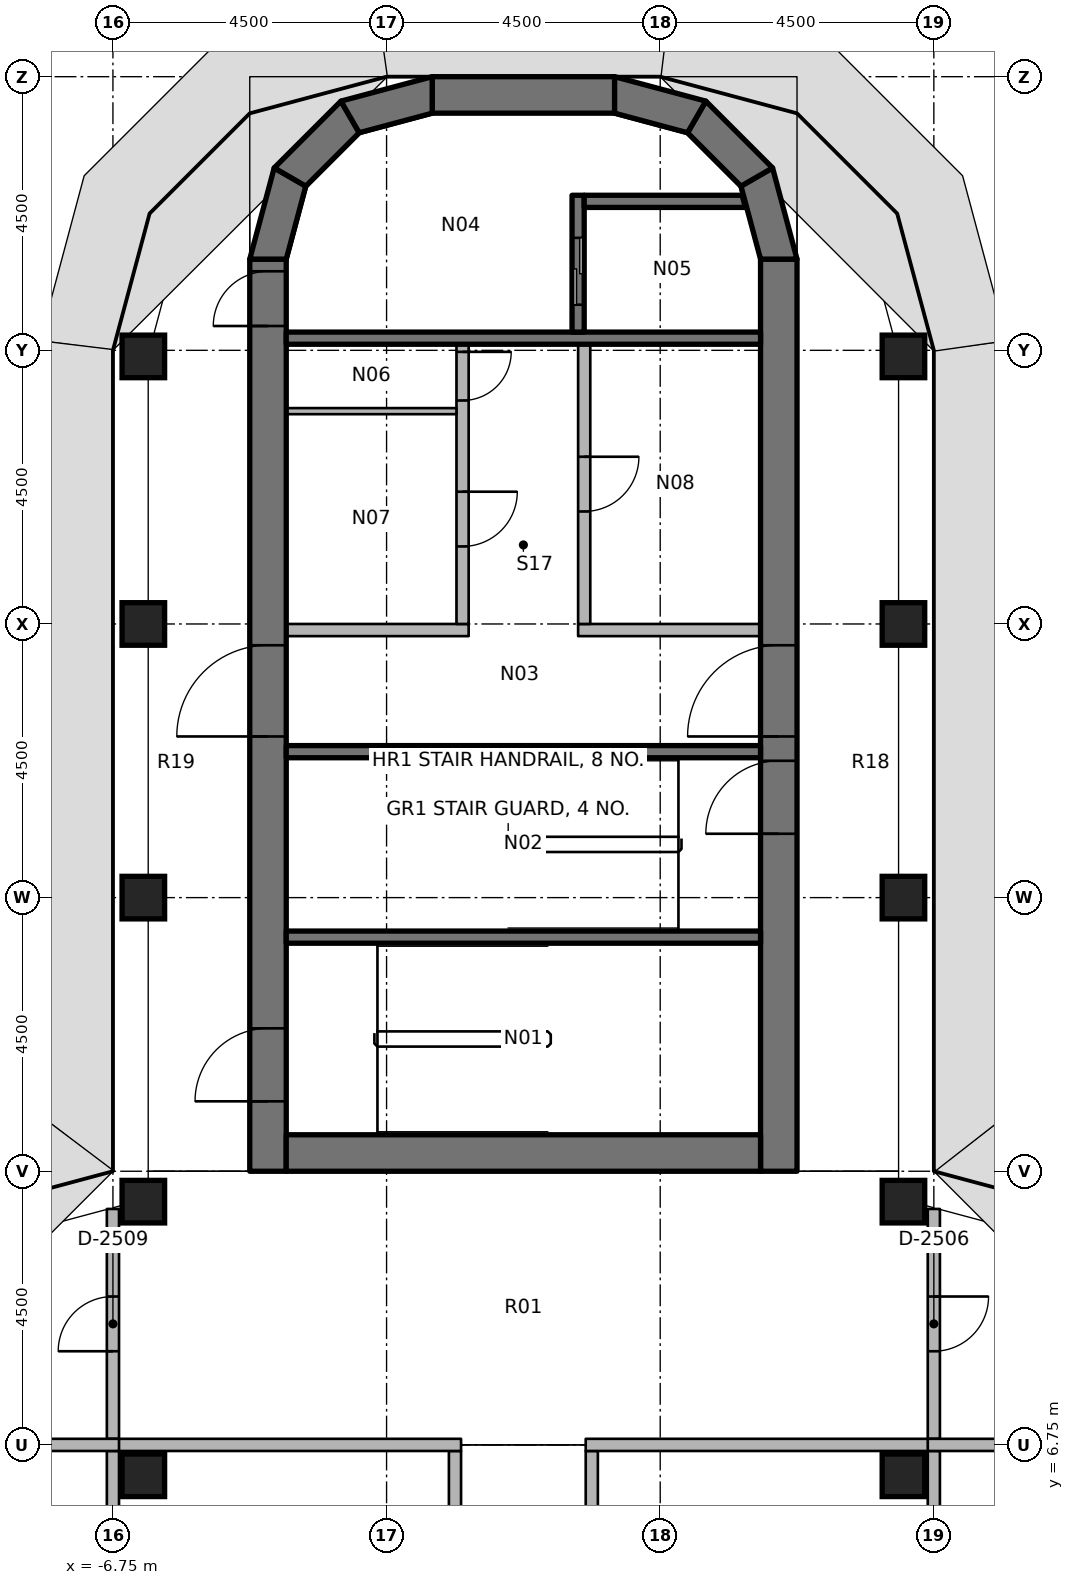
"""IFC4 building model, lengths in metres.
Left out: names, types, materials, properties, quantities, classifications, styles, units other than length and angle.
Written with IfcOpenShell. Run it as: python <this file> out.ifc"""

import sys

from ifc_helpers import new_model, si_unit, direction, frame, frame_2d, origin, origin_2d, place, context, subcontext, project, spatial, polyline, rectangle, outline, extrude, element, fill, save


model = new_model("IFC4")
c1 = context("Model", 3, precision=1e-05, world=origin(), true_north=direction((0.0, 1.0)))
c2 = subcontext(c1, "Body", "Model", "MODEL_VIEW")
j1 = project(units=[si_unit("LENGTHUNIT", "METRE"), si_unit("PLANEANGLEUNIT", "RADIAN")], contexts=[c1])
p1 = place(None, origin())
s1 = spatial("IfcSite", under=j1, at=p1, CompositionType="ELEMENT")
p2 = place(p1, origin())
s2 = spatial("IfcBuilding", under=s1, at=p2, CompositionType="ELEMENT")
p3 = place(p2, frame((0.0, 0.0, 233.4)))
s3 = spatial("IfcBuildingStorey", under=s2, at=p3, CompositionType="ELEMENT", Elevation=233.4)
for number, where, z_axis, x_axis in (
    (1, (-6.25, 6.25, 0.0), (0.0, 0.0, 1.0), (1.0, 0.0, 0.0)),
    (2, (-6.25, 10.75, 0.0), (0.0, 0.0, 1.0), (1.0, 0.0, 0.0)),
    (3, (-6.25, 15.75, 0.0), (0.0, 0.0, 1.0), (1.0, 0.0, 0.0)),
    (4, (-6.25, 20.25, 0.0), (0.0, 0.0, 1.0), (1.0, 0.0, 0.0)),
    (5, (-6.25, 24.65, 0.0), (0.0, 0.0, 1.0), (1.0, 0.0, 0.0)),
    (6, (6.25, 6.25, 0.0), (0.0, 0.0, 1.0), (1.0, 0.0, 0.0)),
    (7, (6.25, 10.75, 0.0), (0.0, 0.0, 1.0), (1.0, 0.0, 0.0)),
    (8, (6.25, 15.75, 0.0), (0.0, 0.0, 1.0), (1.0, 0.0, 0.0)),
    (9, (6.25, 20.25, 0.0), (0.0, 0.0, 1.0), (1.0, 0.0, 0.0)),
    (10, (6.25, 24.65, 0.0), (0.0, 0.0, 1.0), (1.0, 0.0, 0.0)),
):
    element("IfcColumn", number, at=place(p3, frame(where, z_axis=z_axis, x_axis=x_axis)), inside=s3, PredefinedType="COLUMN", context=c2, shape_type="SweptSolid", body=[
        extrude(rectangle(XDim=0.7, YDim=0.7, at=origin_2d()), origin(), (0.0, 0.0, 1.0), 3.65),
    ])
p4 = place(p3, frame((-4.2, 11.25, 0.0), z_axis=(0.0, 0.0, 1.0), x_axis=(0.0, 1.0, 0.0)))
e11 = element("IfcWall", 11, at=p4, inside=s3, PredefinedType="SHEAR", context=c2, shape_type="SweptSolid", body=[
    extrude(rectangle(XDim=15.0, YDim=0.6, at=frame_2d((7.5, 0.0))), origin(), (0.0, 0.0, 1.0), 3.8),
])
p5 = place(p4, frame((7.15, 0.0, 0.0)))
e12 = element("IfcOpeningElement", 12, at=p5, cuts=e11, PredefinedType="OPENING", context=c2, shape_type="SweptSolid", body=[
    extrude(rectangle(XDim=1.5, YDim=2.3, at=frame_2d((0.75, 1.15))), frame((0.0, 0.31, 0.0), z_axis=(0.0, -1.0, 0.0), x_axis=(1.0, 0.0, 0.0)), (0.0, 0.0, 1.0), 0.62),
])
p6 = place(p4, frame((13.9, 0.0, 0.0)))
e13 = element("IfcOpeningElement", 13, at=p6, cuts=e11, PredefinedType="OPENING", context=c2, shape_type="SweptSolid", body=[
    extrude(rectangle(XDim=0.9, YDim=2.1, at=frame_2d((0.45, 1.05))), frame((0.0, 0.31, 0.0), z_axis=(0.0, -1.0, 0.0), x_axis=(1.0, 0.0, 0.0)), (0.0, 0.0, 1.0), 0.62),
])
p7 = place(p4, frame((1.15, 0.0, 0.0)))
e14 = element("IfcOpeningElement", 14, at=p7, cuts=e11, PredefinedType="OPENING", context=c2, shape_type="SweptSolid", body=[
    extrude(rectangle(XDim=1.2, YDim=2.1, at=frame_2d((0.6, 1.05))), frame((0.0, 0.31, 0.0), z_axis=(0.0, -1.0, 0.0), x_axis=(1.0, 0.0, 0.0)), (0.0, 0.0, 1.0), 0.62),
])
p8 = place(p3, frame((4.2, 11.25, 0.0), z_axis=(0.0, 0.0, 1.0), x_axis=(0.0, 1.0, 0.0)))
e15 = element("IfcWall", 15, at=p8, inside=s3, PredefinedType="SHEAR", context=c2, shape_type="SweptSolid", body=[
    extrude(rectangle(XDim=15.0, YDim=0.6, at=frame_2d((7.5, 0.0))), origin(), (0.0, 0.0, 1.0), 3.8),
])
p9 = place(p8, frame((7.15, 0.0, 0.0)))
e16 = element("IfcOpeningElement", 16, at=p9, cuts=e15, PredefinedType="OPENING", context=c2, shape_type="SweptSolid", body=[
    extrude(rectangle(XDim=1.5, YDim=2.3, at=frame_2d((0.75, 1.15))), frame((0.0, 0.31, 0.0), z_axis=(0.0, -1.0, 0.0), x_axis=(1.0, 0.0, 0.0)), (0.0, 0.0, 1.0), 0.62),
])
p10 = place(p8, frame((5.55, 0.0, 0.0)))
e17 = element("IfcOpeningElement", 17, at=p10, cuts=e15, PredefinedType="OPENING", context=c2, shape_type="SweptSolid", body=[
    extrude(rectangle(XDim=1.2, YDim=2.1, at=frame_2d((0.6, 1.05))), frame((0.0, 0.31, 0.0), z_axis=(0.0, -1.0, 0.0), x_axis=(1.0, 0.0, 0.0)), (0.0, 0.0, 1.0), 0.62),
])
p11 = place(p3, frame((-3.9, 11.55, 0.0), z_axis=(0.0, 0.0, 1.0), x_axis=(1.0, 0.0, 0.0)))
e18 = element("IfcWall", 18, at=p11, inside=s3, PredefinedType="SHEAR", context=c2, shape_type="SweptSolid", body=[
    extrude(rectangle(XDim=7.8, YDim=0.6, at=frame_2d((3.9, 0.0))), origin(), (0.0, 0.0, 1.0), 3.8),
])
p12 = place(p3, frame((-1.5, 28.95, 0.0), z_axis=(0.0, 0.0, 1.0), x_axis=(1.0, 0.0, 0.0)))
e19 = element("IfcWall", 19, at=p12, inside=s3, PredefinedType="SHEAR", context=c2, shape_type="SweptSolid", body=[
    extrude(rectangle(XDim=3.0, YDim=0.6, at=frame_2d((1.5, 0.0))), origin(), (0.0, 0.0, 1.0), 3.8),
])
p13 = place(p3, origin())
e20 = element("IfcWall", 20, at=p13, inside=s3, PredefinedType="SHEAR", context=c2, shape_type="SweptSolid", body=[
    extrude(outline(polyline([(-4.5, 26.25), (-4.098, 27.75), (-3.579, 27.45), (-3.9, 26.25), (-4.5, 26.25)])), origin(), (0.0, 0.0, 1.0), 3.8),
])
p14 = place(p3, origin())
e21 = element("IfcWall", 21, at=p14, inside=s3, PredefinedType="SHEAR", context=c2, shape_type="SweptSolid", body=[
    extrude(outline(polyline([(-4.098, 27.75), (-3.0, 28.848), (-2.7, 28.329), (-3.579, 27.45), (-4.098, 27.75)])), origin(), (0.0, 0.0, 1.0), 3.8),
])
p15 = place(p3, origin())
e22 = element("IfcWall", 22, at=p15, inside=s3, PredefinedType="SHEAR", context=c2, shape_type="SweptSolid", body=[
    extrude(outline(polyline([(-3.0, 28.848), (-1.5, 29.25), (-1.5, 28.65), (-2.7, 28.329), (-3.0, 28.848)])), origin(), (0.0, 0.0, 1.0), 3.8),
])
p16 = place(p3, origin())
e23 = element("IfcWall", 23, at=p16, inside=s3, PredefinedType="SHEAR", context=c2, shape_type="SweptSolid", body=[
    extrude(outline(polyline([(4.5, 26.25), (4.098, 27.75), (3.579, 27.45), (3.9, 26.25), (4.5, 26.25)])), origin(), (0.0, 0.0, 1.0), 3.8),
])
p17 = place(p3, origin())
e24 = element("IfcWall", 24, at=p17, inside=s3, PredefinedType="SHEAR", context=c2, shape_type="SweptSolid", body=[
    extrude(outline(polyline([(4.098, 27.75), (3.0, 28.848), (2.7, 28.329), (3.579, 27.45), (4.098, 27.75)])), origin(), (0.0, 0.0, 1.0), 3.8),
])
p18 = place(p3, origin())
e25 = element("IfcWall", 25, at=p18, inside=s3, PredefinedType="SHEAR", context=c2, shape_type="SweptSolid", body=[
    extrude(outline(polyline([(3.0, 28.848), (1.5, 29.25), (1.5, 28.65), (2.7, 28.329), (3.0, 28.848)])), origin(), (0.0, 0.0, 1.0), 3.8),
])
p19 = place(p3, frame((-3.9, 24.95, 0.0), z_axis=(0.0, 0.0, 1.0), x_axis=(1.0, 0.0, 0.0)))
e26 = element("IfcWall", 26, at=p19, inside=s3, PredefinedType="SHEAR", context=c2, shape_type="SweptSolid", body=[
    extrude(rectangle(XDim=7.8, YDim=0.2, at=frame_2d((3.9, 0.0))), origin(), (0.0, 0.0, 1.0), 3.65),
])
p20 = place(p3, frame((0.9, 27.3, 0.0), z_axis=(0.0, 0.0, 1.0), x_axis=(0.0, -1.0, 0.0)))
e27 = element("IfcWall", 27, at=p20, inside=s3, PredefinedType="SHEAR", context=c2, shape_type="SweptSolid", body=[
    extrude(rectangle(XDim=2.25, YDim=0.2, at=frame_2d((1.125, 0.0))), origin(), (0.0, 0.0, 1.0), 3.65),
])
p21 = place(p20, frame((0.7, 0.0, 0.0)))
e28 = element("IfcOpeningElement", 28, at=p21, cuts=e27, PredefinedType="OPENING", context=c2, shape_type="SweptSolid", body=[
    extrude(rectangle(XDim=1.1, YDim=2.3, at=frame_2d((0.55, 1.15))), frame((0.0, 0.11, 0.0), z_axis=(0.0, -1.0, 0.0), x_axis=(1.0, 0.0, 0.0)), (0.0, 0.0, 1.0), 0.22),
])
p22 = place(p3, origin())
e29 = element("IfcWall", 29, at=p22, inside=s3, PredefinedType="SHEAR", context=c2, shape_type="SweptSolid", body=[
    extrude(outline(polyline([(1.0, 27.1), (3.651, 27.1), (3.597, 27.3), (1.0, 27.3), (1.0, 27.1)])), origin(), (0.0, 0.0, 1.0), 3.65),
])
for number, where, z_axis, x_axis in (
    (30, (-3.9, 18.15, 0.0), (0.0, 0.0, 1.0), (1.0, 0.0, 0.0)),
    (31, (-3.9, 15.1, 0.0), (0.0, 0.0, 1.0), (1.0, 0.0, 0.0)),
):
    element("IfcWall", number, at=place(p3, frame(where, z_axis=z_axis, x_axis=x_axis)), inside=s3, PredefinedType="SHEAR", context=c2, shape_type="SweptSolid", body=[
        extrude(rectangle(XDim=7.8, YDim=0.2, at=frame_2d((3.9, 0.0))), origin(), (0.0, 0.0, 1.0), 3.65),
    ])
p23 = place(p3, frame((-3.9, 20.15, 0.0), z_axis=(0.0, 0.0, 1.0), x_axis=(1.0, 0.0, 0.0)))
e32 = element("IfcWall", 32, at=p23, inside=s3, PredefinedType="PARTITIONING", context=c2, shape_type="SweptSolid", body=[
    extrude(rectangle(XDim=3.0, YDim=0.2, at=frame_2d((1.5, 0.0))), origin(), (0.0, 0.0, 1.0), 3.65),
])
p24 = place(p3, frame((-1.0, 24.85, 0.0), z_axis=(0.0, 0.0, 1.0), x_axis=(0.0, -1.0, 0.0)))
e33 = element("IfcWall", 33, at=p24, inside=s3, PredefinedType="PARTITIONING", context=c2, shape_type="SweptSolid", body=[
    extrude(rectangle(XDim=4.6, YDim=0.2, at=frame_2d((2.3, 0.0))), origin(), (0.0, 0.0, 1.0), 3.65),
])
p25 = place(p24, frame((0.125, 0.0, 0.0)))
e34 = element("IfcOpeningElement", 34, at=p25, cuts=e33, PredefinedType="OPENING", context=c2, shape_type="SweptSolid", body=[
    extrude(rectangle(XDim=0.8, YDim=2.1, at=frame_2d((0.4, 1.05))), frame((0.0, 0.11, 0.0), z_axis=(0.0, -1.0, 0.0), x_axis=(1.0, 0.0, 0.0)), (0.0, 0.0, 1.0), 0.22),
])
p26 = place(p24, frame((2.425, 0.0, 0.0)))
e35 = element("IfcOpeningElement", 35, at=p26, cuts=e33, PredefinedType="OPENING", context=c2, shape_type="SweptSolid", body=[
    extrude(rectangle(XDim=0.9, YDim=2.1, at=frame_2d((0.45, 1.05))), frame((0.0, 0.11, 0.0), z_axis=(0.0, -1.0, 0.0), x_axis=(1.0, 0.0, 0.0)), (0.0, 0.0, 1.0), 0.22),
])
p27 = place(p3, frame((0.9, 20.15, 0.0), z_axis=(0.0, 0.0, 1.0), x_axis=(1.0, 0.0, 0.0)))
e36 = element("IfcWall", 36, at=p27, inside=s3, PredefinedType="PARTITIONING", context=c2, shape_type="SweptSolid", body=[
    extrude(rectangle(XDim=3.0, YDim=0.2, at=frame_2d((1.5, 0.0))), origin(), (0.0, 0.0, 1.0), 3.65),
])
p28 = place(p3, frame((1.0, 24.85, 0.0), z_axis=(0.0, 0.0, 1.0), x_axis=(0.0, -1.0, 0.0)))
e37 = element("IfcWall", 37, at=p28, inside=s3, PredefinedType="PARTITIONING", context=c2, shape_type="SweptSolid", body=[
    extrude(rectangle(XDim=4.6, YDim=0.2, at=frame_2d((2.3, 0.0))), origin(), (0.0, 0.0, 1.0), 3.65),
])
p29 = place(p28, frame((1.85, 0.0, 0.0)))
e38 = element("IfcOpeningElement", 38, at=p29, cuts=e37, PredefinedType="OPENING", context=c2, shape_type="SweptSolid", body=[
    extrude(rectangle(XDim=0.9, YDim=2.1, at=frame_2d((0.45, 1.05))), frame((0.0, 0.11, 0.0), z_axis=(0.0, -1.0, 0.0), x_axis=(1.0, 0.0, 0.0)), (0.0, 0.0, 1.0), 0.22),
])
p30 = place(p3, frame((-3.9, 23.75, 0.0), z_axis=(0.0, 0.0, 1.0), x_axis=(1.0, 0.0, 0.0)))
e39 = element("IfcWall", 39, at=p30, inside=s3, PredefinedType="PARTITIONING", context=c2, shape_type="SweptSolid", body=[
    extrude(rectangle(XDim=2.8, YDim=0.1, at=frame_2d((1.4, 0.0))), origin(), (0.0, 0.0, 1.0), 3.65),
])
for number, where, z_axis, x_axis in (
    (40, (1.125, 1.225, 0.0), (0.0, 0.0, 1.0), (0.0, 1.0, 0.0)),
    (41, (-1.125, 1.225, 0.0), (0.0, 0.0, 1.0), (0.0, 1.0, 0.0)),
):
    element("IfcWall", number, at=place(p3, frame(where, z_axis=z_axis, x_axis=x_axis)), inside=s3, PredefinedType="PARTITIONING", context=c2, shape_type="SweptSolid", body=[
        extrude(rectangle(XDim=5.425, YDim=0.2, at=frame_2d((2.712, 0.0))), origin(), (0.0, 0.0, 1.0), 2.746),
    ])
p31 = place(p3, frame((1.025, 6.75, 0.0), z_axis=(0.0, 0.0, 1.0), x_axis=(1.0, 0.0, 0.0)))
e42 = element("IfcWall", 42, at=p31, inside=s3, PredefinedType="PARTITIONING", context=c2, shape_type="SweptSolid", body=[
    extrude(rectangle(XDim=5.825, YDim=0.2, at=frame_2d((2.913, 0.0))), origin(), (0.0, 0.0, 1.0), 2.746),
])
p32 = place(p3, frame((6.75, 10.63, 0.0), z_axis=(0.0, 0.0, 1.0), x_axis=(0.0, -1.0, 0.0)))
e43 = element("IfcWall", 43, at=p32, inside=s3, PredefinedType="PARTITIONING", context=c2, shape_type="SweptSolid", body=[
    extrude(rectangle(XDim=3.78, YDim=0.2, at=frame_2d((1.89, 0.0))), origin(), (0.0, 0.0, 1.0), 2.746),
])
p33 = place(p32, frame((1.44, 0.0, 0.0)))
e44 = element("IfcOpeningElement", 44, at=p33, cuts=e43, PredefinedType="OPENING", context=c2, shape_type="SweptSolid", body=[
    extrude(rectangle(XDim=0.9, YDim=2.1, at=frame_2d((0.45, 1.05))), frame((0.0, 0.11, 0.0), z_axis=(0.0, -1.0, 0.0), x_axis=(1.0, 0.0, 0.0)), (0.0, 0.0, 1.0), 0.22),
])
p34 = place(p3, frame((-6.85, 6.75, 0.0), z_axis=(0.0, 0.0, 1.0), x_axis=(1.0, 0.0, 0.0)))
e45 = element("IfcWall", 45, at=p34, inside=s3, PredefinedType="PARTITIONING", context=c2, shape_type="SweptSolid", body=[
    extrude(rectangle(XDim=5.825, YDim=0.2, at=frame_2d((2.913, 0.0))), origin(), (0.0, 0.0, 1.0), 2.746),
])
p35 = place(p3, frame((-6.75, 6.85, 0.0), z_axis=(0.0, 0.0, 1.0), x_axis=(0.0, 1.0, 0.0)))
e46 = element("IfcWall", 46, at=p35, inside=s3, PredefinedType="PARTITIONING", context=c2, shape_type="SweptSolid", body=[
    extrude(rectangle(XDim=3.78, YDim=0.2, at=frame_2d((1.89, 0.0))), origin(), (0.0, 0.0, 1.0), 2.746),
])
p36 = place(p35, frame((1.44, 0.0, 0.0)))
e47 = element("IfcOpeningElement", 47, at=p36, cuts=e46, PredefinedType="OPENING", context=c2, shape_type="SweptSolid", body=[
    extrude(rectangle(XDim=0.9, YDim=2.1, at=frame_2d((0.45, 1.05))), frame((0.0, 0.11, 0.0), z_axis=(0.0, -1.0, 0.0), x_axis=(1.0, 0.0, 0.0)), (0.0, 0.0, 1.0), 0.22),
])
p37 = place(p3, frame((6.75, 1.225, 0.0), z_axis=(0.0, 0.0, 1.0), x_axis=(0.0, 1.0, 0.0)))
e48 = element("IfcWall", 48, at=p37, inside=s3, PredefinedType="PARTITIONING", context=c2, shape_type="SweptSolid", body=[
    extrude(rectangle(XDim=5.425, YDim=0.2, at=frame_2d((2.712, 0.0))), origin(), (0.0, 0.0, 1.0), 2.746),
])
p38 = place(p3, frame((6.65, 6.75, 0.0), z_axis=(0.0, 0.0, 1.0), x_axis=(1.0, 0.0, 0.0)))
e49 = element("IfcWall", 49, at=p38, inside=s3, PredefinedType="PARTITIONING", context=c2, shape_type="SweptSolid", body=[
    extrude(rectangle(XDim=4.7, YDim=0.2, at=frame_2d((2.35, 0.0))), origin(), (0.0, 0.0, 1.0), 2.746),
])
p39 = place(p3, frame((-6.75, 1.225, 0.0), z_axis=(0.0, 0.0, 1.0), x_axis=(0.0, 1.0, 0.0)))
e50 = element("IfcWall", 50, at=p39, inside=s3, PredefinedType="PARTITIONING", context=c2, shape_type="SweptSolid", body=[
    extrude(rectangle(XDim=5.425, YDim=0.2, at=frame_2d((2.712, 0.0))), origin(), (0.0, 0.0, 1.0), 2.746),
])
p40 = place(p3, frame((-11.35, 6.75, 0.0), z_axis=(0.0, 0.0, 1.0), x_axis=(1.0, 0.0, 0.0)))
e51 = element("IfcWall", 51, at=p40, inside=s3, PredefinedType="PARTITIONING", context=c2, shape_type="SweptSolid", body=[
    extrude(rectangle(XDim=4.7, YDim=0.2, at=frame_2d((2.35, 0.0))), origin(), (0.0, 0.0, 1.0), 2.746),
])
p41 = place(p5, origin())
e52 = element("IfcDoor", 52, at=p41, inside=s3, OperationType="DOUBLE_DOOR_SINGLE_SWING", PredefinedType="DOOR", context=c2, shape_type="SweptSolid", body=[
    extrude(rectangle(XDim=1.5, YDim=2.3, at=frame_2d((0.75, 1.15))), frame((0.0, 0.025, 0.0), z_axis=(0.0, -1.0, 0.0), x_axis=(1.0, 0.0, 0.0)), (0.0, 0.0, 1.0), 0.05),
])
fill(e12, e52)
p42 = place(p9, origin())
e53 = element("IfcDoor", 53, at=p42, inside=s3, OperationType="DOUBLE_DOOR_SINGLE_SWING", PredefinedType="DOOR", context=c2, shape_type="SweptSolid", body=[
    extrude(rectangle(XDim=1.5, YDim=2.3, at=frame_2d((0.75, 1.15))), frame((0.0, 0.025, 0.0), z_axis=(0.0, -1.0, 0.0), x_axis=(1.0, 0.0, 0.0)), (0.0, 0.0, 1.0), 0.05),
])
fill(e16, e53)
p43 = place(p6, origin())
e54 = element("IfcDoor", 54, at=p43, inside=s3, OperationType="SINGLE_SWING_RIGHT", PredefinedType="DOOR", context=c2, shape_type="SweptSolid", body=[
    extrude(rectangle(XDim=0.9, YDim=2.1, at=frame_2d((0.45, 1.05))), frame((0.0, 0.025, 0.0), z_axis=(0.0, -1.0, 0.0), x_axis=(1.0, 0.0, 0.0)), (0.0, 0.0, 1.0), 0.05),
])
fill(e13, e54)
p44 = place(p10, origin())
e55 = element("IfcDoor", 55, at=p44, inside=s3, OperationType="SINGLE_SWING_LEFT", PredefinedType="DOOR", context=c2, shape_type="SweptSolid", body=[
    extrude(rectangle(XDim=1.2, YDim=2.1, at=frame_2d((0.6, 1.05))), frame((0.0, 0.025, 0.0), z_axis=(0.0, -1.0, 0.0), x_axis=(1.0, 0.0, 0.0)), (0.0, 0.0, 1.0), 0.05),
])
fill(e17, e55)
p45 = place(p7, origin())
e56 = element("IfcDoor", 56, at=p45, inside=s3, OperationType="SINGLE_SWING_LEFT", PredefinedType="DOOR", context=c2, shape_type="SweptSolid", body=[
    extrude(rectangle(XDim=1.2, YDim=2.1, at=frame_2d((0.6, 1.05))), frame((0.0, 0.025, 0.0), z_axis=(0.0, -1.0, 0.0), x_axis=(1.0, 0.0, 0.0)), (0.0, 0.0, 1.0), 0.05),
])
fill(e14, e56)
p46 = place(p21, origin())
e57 = element("IfcDoor", 57, at=p46, inside=s3, OperationType="DOUBLE_DOOR_SLIDING", PredefinedType="DOOR", context=c2, shape_type="SweptSolid", body=[
    extrude(rectangle(XDim=1.1, YDim=2.3, at=frame_2d((0.55, 1.15))), frame((0.0, 0.025, 0.0), z_axis=(0.0, -1.0, 0.0), x_axis=(1.0, 0.0, 0.0)), (0.0, 0.0, 1.0), 0.05),
])
fill(e28, e57)
p47 = place(p25, origin())
e58 = element("IfcDoor", 58, at=p47, inside=s3, OperationType="SINGLE_SWING_LEFT", PredefinedType="DOOR", context=c2, shape_type="SweptSolid", body=[
    extrude(rectangle(XDim=0.8, YDim=2.1, at=frame_2d((0.4, 1.05))), frame((0.0, 0.025, 0.0), z_axis=(0.0, -1.0, 0.0), x_axis=(1.0, 0.0, 0.0)), (0.0, 0.0, 1.0), 0.05),
])
fill(e34, e58)
p48 = place(p26, origin())
e59 = element("IfcDoor", 59, at=p48, inside=s3, OperationType="SINGLE_SWING_RIGHT", PredefinedType="DOOR", context=c2, shape_type="SweptSolid", body=[
    extrude(rectangle(XDim=0.9, YDim=2.1, at=frame_2d((0.45, 1.05))), frame((0.0, 0.025, 0.0), z_axis=(0.0, -1.0, 0.0), x_axis=(1.0, 0.0, 0.0)), (0.0, 0.0, 1.0), 0.05),
])
fill(e35, e59)
p49 = place(p29, origin())
e60 = element("IfcDoor", 60, at=p49, inside=s3, OperationType="SINGLE_SWING_RIGHT", PredefinedType="DOOR", context=c2, shape_type="SweptSolid", body=[
    extrude(rectangle(XDim=0.9, YDim=2.1, at=frame_2d((0.45, 1.05))), frame((0.0, 0.025, 0.0), z_axis=(0.0, -1.0, 0.0), x_axis=(1.0, 0.0, 0.0)), (0.0, 0.0, 1.0), 0.05),
])
fill(e38, e60)
p50 = place(p33, origin())
e61 = element("IfcDoor", 61, at=p50, inside=s3, OperationType="SINGLE_SWING_RIGHT", PredefinedType="DOOR", context=c2, shape_type="SweptSolid", body=[
    extrude(rectangle(XDim=0.9, YDim=2.1, at=frame_2d((0.45, 1.05))), frame((0.0, 0.025, 0.0), z_axis=(0.0, -1.0, 0.0), x_axis=(1.0, 0.0, 0.0)), (0.0, 0.0, 1.0), 0.05),
])
fill(e44, e61)
p51 = place(p36, origin())
e62 = element("IfcDoor", 62, at=p51, inside=s3, OperationType="SINGLE_SWING_LEFT", PredefinedType="DOOR", context=c2, shape_type="SweptSolid", body=[
    extrude(rectangle(XDim=0.9, YDim=2.1, at=frame_2d((0.45, 1.05))), frame((0.0, 0.025, 0.0), z_axis=(0.0, -1.0, 0.0), x_axis=(1.0, 0.0, 0.0)), (0.0, 0.0, 1.0), 0.05),
])
fill(e47, e62)
save(model, sys.argv[1])
